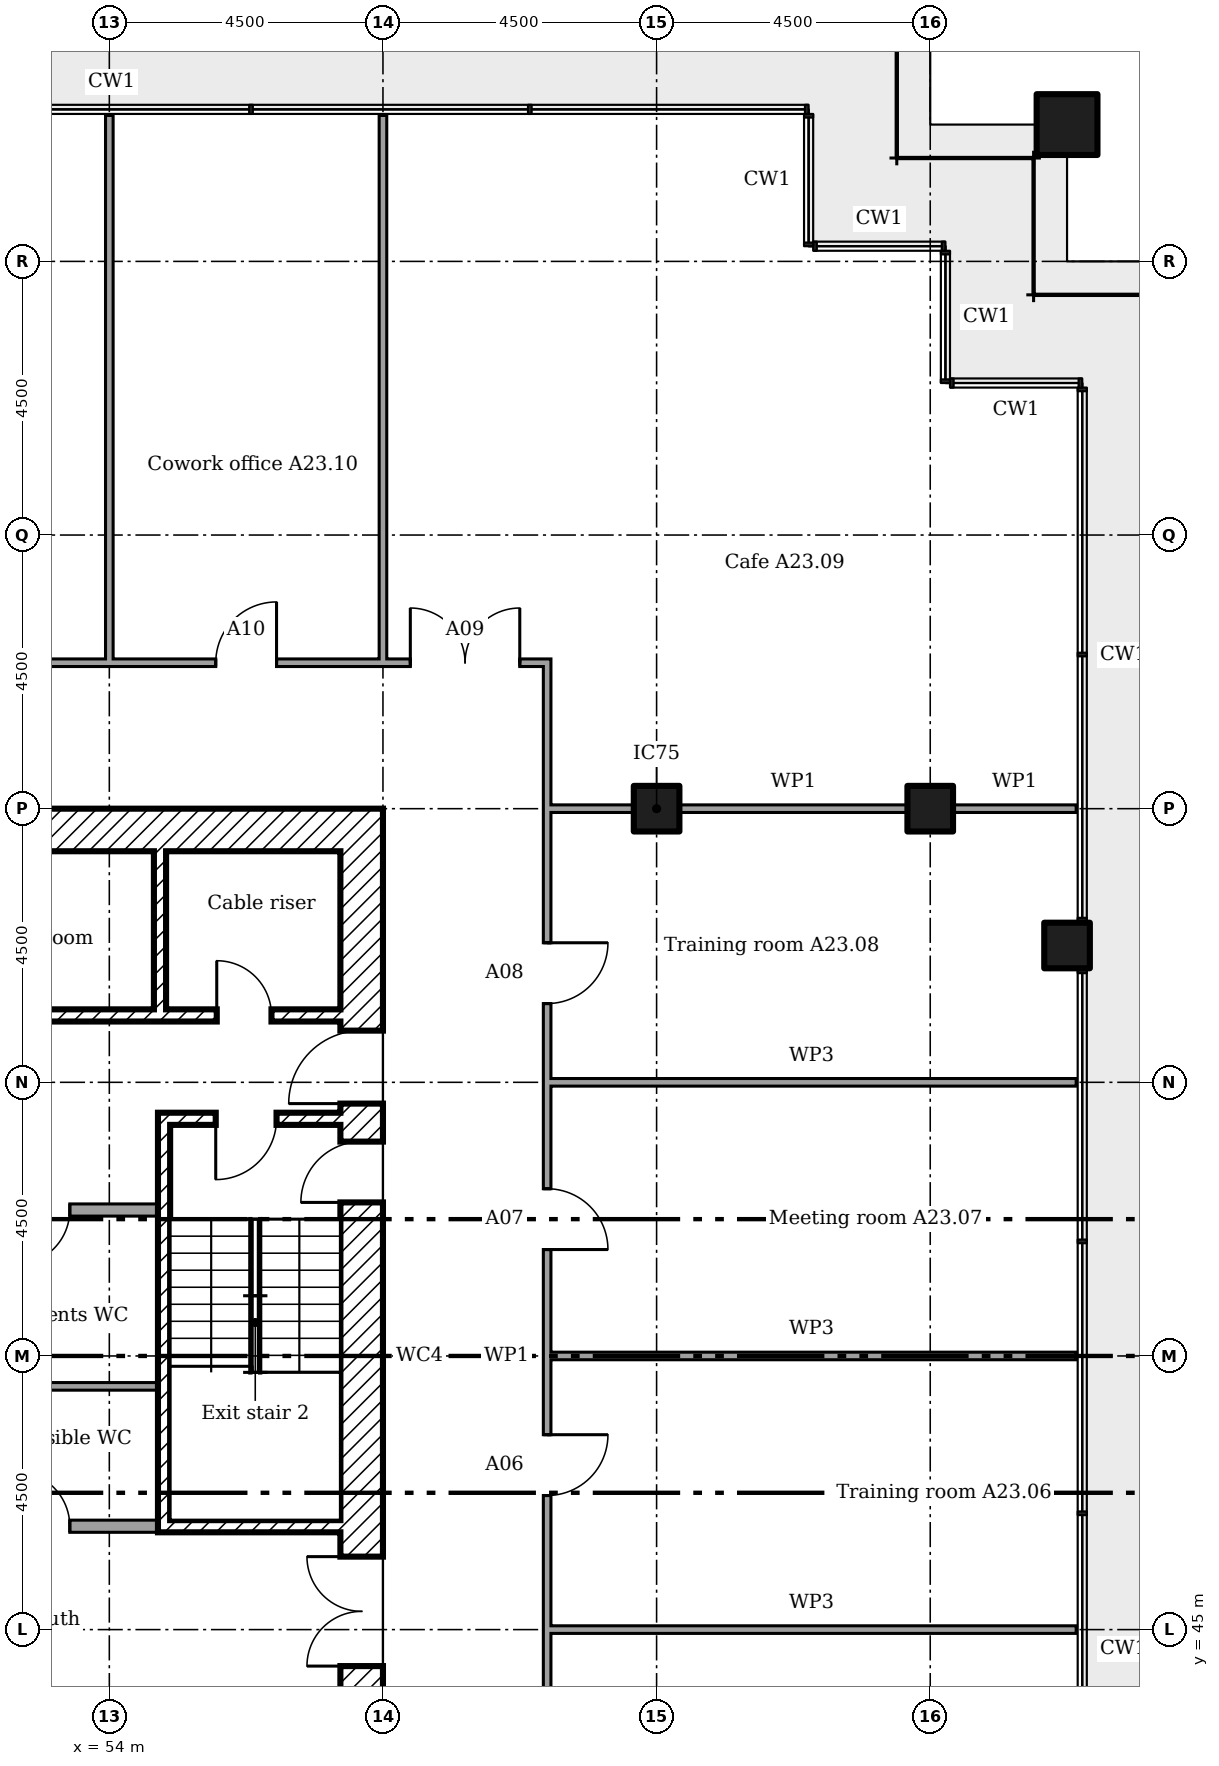
"""IFC4 building model, lengths in metres.
Left out: names, types, materials, properties, quantities, classifications, styles, units other than length and angle.
Written with IfcOpenShell. Run it as: python <this file> out.ifc"""

import sys

from ifc_helpers import new_model, si_unit, direction, frame, frame_2d, origin, origin_2d, place, context, subcontext, project, spatial, rectangle, extrude, element, fill, save


model = new_model("IFC4")
c1 = context("Model", 3, precision=1e-05, world=origin(), true_north=direction((0.0, 1.0)))
c2 = subcontext(c1, "Body", "Model", "MODEL_VIEW")
j1 = project(units=[si_unit("LENGTHUNIT", "METRE"), si_unit("PLANEANGLEUNIT", "RADIAN")], contexts=[c1])
p1 = place(None, origin())
s1 = spatial("IfcSite", under=j1, at=p1, CompositionType="ELEMENT")
p2 = place(p1, origin())
s2 = spatial("IfcBuilding", under=s1, at=p2, CompositionType="ELEMENT")
p3 = place(p2, frame((0.0, 0.0, 95.6)))
s3 = spatial("IfcBuildingStorey", under=s2, at=p3, CompositionType="ELEMENT", Elevation=95.6)
p4 = place(p3, frame((69.75, 69.75, 0.0)))
e1 = element("IfcColumn", 1, at=p4, inside=s3, PredefinedType="COLUMN", context=c2, shape_type="SweptSolid", body=[
    extrude(rectangle(XDim=1.0, YDim=1.0, at=origin_2d()), origin(), (0.0, 0.0, 1.0), 3.6),
])
for number, where in (
    (2, (63.0, 58.5, 0.0)),
    (3, (67.5, 58.5, 0.0)),
    (4, (69.75, 56.25, 0.0)),
):
    element("IfcColumn", number, at=place(p3, frame(where)), inside=s3, PredefinedType="COLUMN", context=c2, shape_type="SweptSolid", body=[
        extrude(rectangle(XDim=0.75, YDim=0.75, at=origin_2d()), origin(), (0.0, 0.0, 1.0), 3.6),
    ])
p5 = place(p3, frame((58.15, 40.5, 0.0), z_axis=(0.0, 0.0, 1.0), x_axis=(0.0, 1.0, 0.0)))
e5 = element("IfcWall", 5, at=p5, inside=s3, PredefinedType="SHEAR", context=c2, shape_type="SweptSolid", body=[
    extrude(rectangle(XDim=18.0, YDim=0.7, at=frame_2d((9.0, 0.0))), origin(), (0.0, 0.0, 1.0), 3.35),
])
p6 = place(p5, frame((13.15, 0.0, 0.0)))
e6 = element("IfcOpeningElement", 6, at=p6, cuts=e5, PredefinedType="OPENING", context=c2, shape_type="SweptSolid", body=[
    extrude(rectangle(XDim=1.2, YDim=2.1, at=frame_2d((0.6, 1.05))), frame((0.0, 0.36, 0.0), z_axis=(0.0, -1.0, 0.0), x_axis=(1.0, 0.0, 0.0)), (0.0, 0.0, 1.0), 0.72),
])
p7 = place(p5, frame((3.9, 0.0, 0.0)))
e7 = element("IfcOpeningElement", 7, at=p7, cuts=e5, PredefinedType="OPENING", context=c2, shape_type="SweptSolid", body=[
    extrude(rectangle(XDim=1.8, YDim=2.1, at=frame_2d((0.9, 1.05))), frame((0.0, 0.36, 0.0), z_axis=(0.0, -1.0, 0.0), x_axis=(1.0, 0.0, 0.0)), (0.0, 0.0, 1.0), 0.72),
])
p8 = place(p5, frame((11.525, 0.0, 0.0)))
e8 = element("IfcOpeningElement", 8, at=p8, cuts=e5, PredefinedType="OPENING", context=c2, shape_type="SweptSolid", body=[
    extrude(rectangle(XDim=1.0, YDim=2.1, at=frame_2d((0.5, 1.05))), frame((0.0, 0.36, 0.0), z_axis=(0.0, -1.0, 0.0), x_axis=(1.0, 0.0, 0.0)), (0.0, 0.0, 1.0), 0.72),
])
p9 = place(p3, frame((41.2, 58.15, 0.0)))
e9 = element("IfcWall", 9, at=p9, inside=s3, PredefinedType="SHEAR", context=c2, shape_type="SweptSolid", body=[
    extrude(rectangle(XDim=16.6, YDim=0.7, at=frame_2d((8.3, 0.0))), origin(), (0.0, 0.0, 1.0), 3.35),
])
p10 = place(p3, frame((54.833, 57.8, 0.0), z_axis=(0.0, 0.0, 1.0), x_axis=(0.0, -1.0, 0.0)))
e10 = element("IfcWall", 10, at=p10, inside=s3, PredefinedType="SHEAR", context=c2, shape_type="SweptSolid", body=[
    extrude(rectangle(XDim=2.6, YDim=0.2, at=frame_2d((1.3, 0.0))), origin(), (0.0, 0.0, 1.0), 3.35),
])
p11 = place(p3, frame((46.933, 55.1, 0.0)))
e11 = element("IfcWall", 11, at=p11, inside=s3, PredefinedType="SHEAR", context=c2, shape_type="SweptSolid", body=[
    extrude(rectangle(XDim=10.867, YDim=0.2, at=frame_2d((5.433, 0.0))), origin(), (0.0, 0.0, 1.0), 3.35),
])
p12 = place(p11, frame((8.833, 0.0, 0.0)))
e12 = element("IfcOpeningElement", 12, at=p12, cuts=e11, PredefinedType="OPENING", context=c2, shape_type="SweptSolid", body=[
    extrude(rectangle(XDim=0.9, YDim=2.1, at=frame_2d((0.45, 1.05))), frame((0.0, 0.11, 0.0), z_axis=(0.0, -1.0, 0.0), x_axis=(1.0, 0.0, 0.0)), (0.0, 0.0, 1.0), 0.22),
])
p13 = place(p11, frame((3.45, 0.0, 0.0)))
e13 = element("IfcOpeningElement", 13, at=p13, cuts=e11, PredefinedType="OPENING", context=c2, shape_type="SweptSolid", body=[
    extrude(rectangle(XDim=0.9, YDim=2.1, at=frame_2d((0.45, 1.05))), frame((0.0, 0.11, 0.0), z_axis=(0.0, -1.0, 0.0), x_axis=(1.0, 0.0, 0.0)), (0.0, 0.0, 1.0), 0.22),
])
p14 = place(p3, frame((54.8, 53.4, 0.0)))
e14 = element("IfcWall", 14, at=p14, inside=s3, PredefinedType="SHEAR", context=c2, shape_type="SweptSolid", body=[
    extrude(rectangle(XDim=3.0, YDim=0.2, at=frame_2d((1.5, 0.0))), origin(), (0.0, 0.0, 1.0), 3.35),
])
p15 = place(p14, frame((0.95, 0.0, 0.0)))
e15 = element("IfcOpeningElement", 15, at=p15, cuts=e14, PredefinedType="OPENING", context=c2, shape_type="SweptSolid", body=[
    extrude(rectangle(XDim=1.0, YDim=2.1, at=frame_2d((0.5, 1.05))), frame((0.0, 0.11, 0.0), z_axis=(0.0, -1.0, 0.0), x_axis=(1.0, 0.0, 0.0)), (0.0, 0.0, 1.0), 0.22),
])
p16 = place(p3, frame((54.8, 46.7, 0.0)))
e16 = element("IfcWall", 16, at=p16, inside=s3, PredefinedType="SHEAR", context=c2, shape_type="SweptSolid", body=[
    extrude(rectangle(XDim=3.0, YDim=0.2, at=frame_2d((1.5, 0.0))), origin(), (0.0, 0.0, 1.0), 3.35),
])
p17 = place(p3, frame((54.9, 46.8, 0.0), z_axis=(0.0, 0.0, 1.0), x_axis=(0.0, 1.0, 0.0)))
e17 = element("IfcWall", 17, at=p17, inside=s3, PredefinedType="SHEAR", context=c2, shape_type="SweptSolid", body=[
    extrude(rectangle(XDim=6.5, YDim=0.2, at=frame_2d((3.25, 0.0))), origin(), (0.0, 0.0, 1.0), 3.35),
])
p18 = place(p3, frame((44.2, 51.9, 0.0)))
e18 = element("IfcWall", 18, at=p18, inside=s3, PredefinedType="PARTITIONING", context=c2, shape_type="SweptSolid", body=[
    extrude(rectangle(XDim=10.6, YDim=0.2, at=frame_2d((5.3, 0.0))), origin(), (0.0, 0.0, 1.0), 3.35),
])
p19 = place(p18, frame((5.175, 0.0, 0.0)))
e19 = element("IfcOpeningElement", 19, at=p19, cuts=e18, PredefinedType="OPENING", context=c2, shape_type="SweptSolid", body=[
    extrude(rectangle(XDim=0.9, YDim=2.1, at=frame_2d((0.45, 1.05))), frame((0.0, 0.11, 0.0), z_axis=(0.0, -1.0, 0.0), x_axis=(1.0, 0.0, 0.0)), (0.0, 0.0, 1.0), 0.22),
])
p20 = place(p18, frame((8.25, 0.0, 0.0)))
e20 = element("IfcOpeningElement", 20, at=p20, cuts=e18, PredefinedType="OPENING", context=c2, shape_type="SweptSolid", body=[
    extrude(rectangle(XDim=0.9, YDim=2.1, at=frame_2d((0.45, 1.05))), frame((0.0, 0.11, 0.0), z_axis=(0.0, -1.0, 0.0), x_axis=(1.0, 0.0, 0.0)), (0.0, 0.0, 1.0), 0.22),
])
p21 = place(p3, frame((44.2, 46.7, 0.0)))
e21 = element("IfcWall", 21, at=p21, inside=s3, PredefinedType="PARTITIONING", context=c2, shape_type="SweptSolid", body=[
    extrude(rectangle(XDim=10.6, YDim=0.2, at=frame_2d((5.3, 0.0))), origin(), (0.0, 0.0, 1.0), 3.35),
])
p22 = place(p21, frame((1.15, 0.0, 0.0)))
e22 = element("IfcOpeningElement", 22, at=p22, cuts=e21, PredefinedType="OPENING", context=c2, shape_type="SweptSolid", body=[
    extrude(rectangle(XDim=0.9, YDim=2.1, at=frame_2d((0.45, 1.05))), frame((0.0, 0.11, 0.0), z_axis=(0.0, -1.0, 0.0), x_axis=(1.0, 0.0, 0.0)), (0.0, 0.0, 1.0), 0.22),
])
p23 = place(p21, frame((8.25, 0.0, 0.0)))
e23 = element("IfcOpeningElement", 23, at=p23, cuts=e21, PredefinedType="OPENING", context=c2, shape_type="SweptSolid", body=[
    extrude(rectangle(XDim=0.9, YDim=2.1, at=frame_2d((0.45, 1.05))), frame((0.0, 0.11, 0.0), z_axis=(0.0, -1.0, 0.0), x_axis=(1.0, 0.0, 0.0)), (0.0, 0.0, 1.0), 0.22),
])
p24 = place(p3, frame((54.8, 49.0, 0.0), z_axis=(0.0, 0.0, 1.0), x_axis=(-1.0, 0.0, 0.0)))
e24 = element("IfcWall", 24, at=p24, inside=s3, PredefinedType="PARTITIONING", context=c2, shape_type="SweptSolid", body=[
    extrude(rectangle(XDim=3.738, YDim=0.125, at=frame_2d((1.869, 0.0))), origin(), (0.0, 0.0, 1.0), 3.35),
])
for number, where in (
    (25, (61.2, 45.0, 0.0)),
    (26, (61.2, 49.5, 0.0)),
    (27, (61.2, 54.0, 0.0)),
):
    element("IfcWall", number, at=place(p3, frame(where)), inside=s3, PredefinedType="MOVABLE", context=c2, shape_type="SweptSolid", body=[
        extrude(rectangle(XDim=8.7, YDim=0.125, at=frame_2d((4.35, 0.0))), origin(), (0.0, 0.0, 1.0), 2.766),
    ])
p25 = place(p3, frame((61.2, 58.5, 0.0)))
e28 = element("IfcWall", 28, at=p25, inside=s3, PredefinedType="PARTITIONING", context=c2, shape_type="SweptSolid", body=[
    extrude(rectangle(XDim=1.425, YDim=0.125, at=frame_2d((0.712, 0.0))), origin(), (0.0, 0.0, 1.0), 2.676),
])
p26 = place(p3, frame((63.375, 58.5, 0.0)))
e29 = element("IfcWall", 29, at=p26, inside=s3, PredefinedType="PARTITIONING", context=c2, shape_type="SweptSolid", body=[
    extrude(rectangle(XDim=3.75, YDim=0.125, at=frame_2d((1.875, 0.0))), origin(), (0.0, 0.0, 1.0), 2.676),
])
p27 = place(p3, frame((67.875, 58.5, 0.0)))
e30 = element("IfcWall", 30, at=p27, inside=s3, PredefinedType="PARTITIONING", context=c2, shape_type="SweptSolid", body=[
    extrude(rectangle(XDim=2.025, YDim=0.125, at=frame_2d((1.012, 0.0))), origin(), (0.0, 0.0, 1.0), 2.676),
])
p28 = place(p3, frame((42.6, 60.9, 0.0)))
e31 = element("IfcWall", 31, at=p28, inside=s3, PredefinedType="PARTITIONING", context=c2, shape_type="SweptSolid", body=[
    extrude(rectangle(XDim=18.662, YDim=0.125, at=frame_2d((9.331, 0.0))), origin(), (0.0, 0.0, 1.0), 3.45),
])
p29 = place(p28, frame((16.35, 0.0, 0.0)))
e32 = element("IfcOpeningElement", 32, at=p29, cuts=e31, PredefinedType="OPENING", context=c2, shape_type="SweptSolid", body=[
    extrude(rectangle(XDim=1.8, YDim=2.1, at=frame_2d((0.9, 1.05))), frame((0.0, 0.073, 0.0), z_axis=(0.0, -1.0, 0.0), x_axis=(1.0, 0.0, 0.0)), (0.0, 0.0, 1.0), 0.145),
])
p30 = place(p28, frame((13.15, 0.0, 0.0)))
e33 = element("IfcOpeningElement", 33, at=p30, cuts=e31, PredefinedType="OPENING", context=c2, shape_type="SweptSolid", body=[
    extrude(rectangle(XDim=1.0, YDim=2.1, at=frame_2d((0.5, 1.05))), frame((0.0, 0.073, 0.0), z_axis=(0.0, -1.0, 0.0), x_axis=(1.0, 0.0, 0.0)), (0.0, 0.0, 1.0), 0.145),
])
p31 = place(p28, frame((8.195, 0.0, 0.0)))
e34 = element("IfcOpeningElement", 34, at=p31, cuts=e31, PredefinedType="OPENING", context=c2, shape_type="SweptSolid", body=[
    extrude(rectangle(XDim=1.0, YDim=2.1, at=frame_2d((0.5, 1.05))), frame((0.0, 0.073, 0.0), z_axis=(0.0, -1.0, 0.0), x_axis=(1.0, 0.0, 0.0)), (0.0, 0.0, 1.0), 0.145),
])
p32 = place(p28, frame((3.825, 0.0, 0.0)))
e35 = element("IfcOpeningElement", 35, at=p32, cuts=e31, PredefinedType="OPENING", context=c2, shape_type="SweptSolid", body=[
    extrude(rectangle(XDim=1.0, YDim=2.1, at=frame_2d((0.5, 1.05))), frame((0.0, 0.073, 0.0), z_axis=(0.0, -1.0, 0.0), x_axis=(1.0, 0.0, 0.0)), (0.0, 0.0, 1.0), 0.145),
])
for number, where, z_axis, x_axis in (
    (36, (54.0, 60.9, 0.0), (0.0, 0.0, 1.0), (0.0, 1.0, 0.0)),
    (37, (58.5, 60.9, 0.0), (0.0, 0.0, 1.0), (0.0, 1.0, 0.0)),
):
    element("IfcWall", number, at=place(p3, frame(where, z_axis=z_axis, x_axis=x_axis)), inside=s3, PredefinedType="PARTITIONING", context=c2, shape_type="SweptSolid", body=[
        extrude(rectangle(XDim=9.0, YDim=0.125, at=frame_2d((4.5, 0.0))), origin(), (0.0, 0.0, 1.0), 2.766),
    ])
p33 = place(p3, frame((61.2, 38.163, 0.0), z_axis=(0.0, 0.0, 1.0), x_axis=(0.0, 1.0, 0.0)))
e38 = element("IfcWall", 38, at=p33, inside=s3, PredefinedType="PARTITIONING", context=c2, shape_type="SweptSolid", body=[
    extrude(rectangle(XDim=22.675, YDim=0.125, at=frame_2d((11.337, 0.0))), origin(), (0.0, 0.0, 1.0), 3.45),
])
p34 = place(p33, frame((3.633, 0.0, 0.0)))
e39 = element("IfcOpeningElement", 39, at=p34, cuts=e38, PredefinedType="OPENING", context=c2, shape_type="SweptSolid", body=[
    extrude(rectangle(XDim=1.0, YDim=2.1, at=frame_2d((0.5, 1.05))), frame((0.0, 0.073, 0.0), z_axis=(0.0, -1.0, 0.0), x_axis=(1.0, 0.0, 0.0)), (0.0, 0.0, 1.0), 0.145),
])
p35 = place(p33, frame((9.042, 0.0, 0.0)))
e40 = element("IfcOpeningElement", 40, at=p35, cuts=e38, PredefinedType="OPENING", context=c2, shape_type="SweptSolid", body=[
    extrude(rectangle(XDim=1.0, YDim=2.1, at=frame_2d((0.5, 1.05))), frame((0.0, 0.073, 0.0), z_axis=(0.0, -1.0, 0.0), x_axis=(1.0, 0.0, 0.0)), (0.0, 0.0, 1.0), 0.145),
])
p36 = place(p33, frame((13.087, 0.0, 0.0)))
e41 = element("IfcOpeningElement", 41, at=p36, cuts=e38, PredefinedType="OPENING", context=c2, shape_type="SweptSolid", body=[
    extrude(rectangle(XDim=1.0, YDim=2.1, at=frame_2d((0.5, 1.05))), frame((0.0, 0.073, 0.0), z_axis=(0.0, -1.0, 0.0), x_axis=(1.0, 0.0, 0.0)), (0.0, 0.0, 1.0), 0.145),
])
p37 = place(p33, frame((17.133, 0.0, 0.0)))
e42 = element("IfcOpeningElement", 42, at=p37, cuts=e38, PredefinedType="OPENING", context=c2, shape_type="SweptSolid", body=[
    extrude(rectangle(XDim=1.0, YDim=2.1, at=frame_2d((0.5, 1.05))), frame((0.0, 0.073, 0.0), z_axis=(0.0, -1.0, 0.0), x_axis=(1.0, 0.0, 0.0)), (0.0, 0.0, 1.0), 0.145),
])
p38 = place(p6, origin())
e43 = element("IfcDoor", 43, at=p38, inside=s3, OperationType="SINGLE_SWING_RIGHT", PredefinedType="DOOR", context=c2, shape_type="SweptSolid", body=[
    extrude(rectangle(XDim=1.2, YDim=2.1, at=frame_2d((0.6, 1.05))), frame((0.0, 0.025, 0.0), z_axis=(0.0, -1.0, 0.0), x_axis=(1.0, 0.0, 0.0)), (0.0, 0.0, 1.0), 0.05),
])
fill(e6, e43)
p39 = place(p7, origin())
e44 = element("IfcDoor", 44, at=p39, inside=s3, OperationType="DOUBLE_DOOR_SINGLE_SWING", PredefinedType="DOOR", context=c2, shape_type="SweptSolid", body=[
    extrude(rectangle(XDim=1.8, YDim=2.1, at=frame_2d((0.9, 1.05))), frame((0.0, 0.025, 0.0), z_axis=(0.0, -1.0, 0.0), x_axis=(1.0, 0.0, 0.0)), (0.0, 0.0, 1.0), 0.05),
])
fill(e7, e44)
p40 = place(p15, frame((1.0, 0.0, 0.0), x_axis=(-1.0, 0.0, 0.0)))
e45 = element("IfcDoor", 45, at=p40, inside=s3, OperationType="SINGLE_SWING_LEFT", PredefinedType="DOOR", context=c2, shape_type="SweptSolid", body=[
    extrude(rectangle(XDim=1.0, YDim=2.1, at=frame_2d((0.5, 1.05))), frame((0.0, 0.025, 0.0), z_axis=(0.0, -1.0, 0.0), x_axis=(1.0, 0.0, 0.0)), (0.0, 0.0, 1.0), 0.05),
])
fill(e15, e45)
p41 = place(p8, origin())
e46 = element("IfcDoor", 46, at=p41, inside=s3, OperationType="SINGLE_SWING_RIGHT", PredefinedType="DOOR", context=c2, shape_type="SweptSolid", body=[
    extrude(rectangle(XDim=1.0, YDim=2.1, at=frame_2d((0.5, 1.05))), frame((0.0, 0.025, 0.0), z_axis=(0.0, -1.0, 0.0), x_axis=(1.0, 0.0, 0.0)), (0.0, 0.0, 1.0), 0.05),
])
fill(e8, e46)
p42 = place(p12, origin())
e47 = element("IfcDoor", 47, at=p42, inside=s3, OperationType="SINGLE_SWING_RIGHT", PredefinedType="DOOR", context=c2, shape_type="SweptSolid", body=[
    extrude(rectangle(XDim=0.9, YDim=2.1, at=frame_2d((0.45, 1.05))), frame((0.0, 0.025, 0.0), z_axis=(0.0, -1.0, 0.0), x_axis=(1.0, 0.0, 0.0)), (0.0, 0.0, 1.0), 0.05),
])
fill(e12, e47)
p43 = place(p23, origin())
e48 = element("IfcDoor", 48, at=p43, inside=s3, OperationType="SINGLE_SWING_RIGHT", PredefinedType="DOOR", context=c2, shape_type="SweptSolid", body=[
    extrude(rectangle(XDim=0.9, YDim=2.1, at=frame_2d((0.45, 1.05))), frame((0.0, 0.025, 0.0), z_axis=(0.0, -1.0, 0.0), x_axis=(1.0, 0.0, 0.0)), (0.0, 0.0, 1.0), 0.05),
])
fill(e23, e48)
p44 = place(p20, frame((0.9, 0.0, 0.0), x_axis=(-1.0, 0.0, 0.0)))
e49 = element("IfcDoor", 49, at=p44, inside=s3, OperationType="SINGLE_SWING_LEFT", PredefinedType="DOOR", context=c2, shape_type="SweptSolid", body=[
    extrude(rectangle(XDim=0.9, YDim=2.1, at=frame_2d((0.45, 1.05))), frame((0.0, 0.025, 0.0), z_axis=(0.0, -1.0, 0.0), x_axis=(1.0, 0.0, 0.0)), (0.0, 0.0, 1.0), 0.05),
])
fill(e20, e49)
p45 = place(p35, frame((1.0, 0.0, 0.0), x_axis=(-1.0, 0.0, 0.0)))
e50 = element("IfcDoor", 50, at=p45, inside=s3, OperationType="SINGLE_SWING_RIGHT", PredefinedType="DOOR", context=c2, shape_type="SweptSolid", body=[
    extrude(rectangle(XDim=1.0, YDim=2.1, at=frame_2d((0.5, 1.05))), frame((0.0, 0.025, 0.0), z_axis=(0.0, -1.0, 0.0), x_axis=(1.0, 0.0, 0.0)), (0.0, 0.0, 1.0), 0.05),
])
fill(e40, e50)
p46 = place(p36, frame((1.0, 0.0, 0.0), x_axis=(-1.0, 0.0, 0.0)))
e51 = element("IfcDoor", 51, at=p46, inside=s3, OperationType="SINGLE_SWING_LEFT", PredefinedType="DOOR", context=c2, shape_type="SweptSolid", body=[
    extrude(rectangle(XDim=1.0, YDim=2.1, at=frame_2d((0.5, 1.05))), frame((0.0, 0.025, 0.0), z_axis=(0.0, -1.0, 0.0), x_axis=(1.0, 0.0, 0.0)), (0.0, 0.0, 1.0), 0.05),
])
fill(e41, e51)
p47 = place(p37, frame((1.0, 0.0, 0.0), x_axis=(-1.0, 0.0, 0.0)))
e52 = element("IfcDoor", 52, at=p47, inside=s3, OperationType="SINGLE_SWING_RIGHT", PredefinedType="DOOR", context=c2, shape_type="SweptSolid", body=[
    extrude(rectangle(XDim=1.0, YDim=2.1, at=frame_2d((0.5, 1.05))), frame((0.0, 0.025, 0.0), z_axis=(0.0, -1.0, 0.0), x_axis=(1.0, 0.0, 0.0)), (0.0, 0.0, 1.0), 0.05),
])
fill(e42, e52)
p48 = place(p29, origin())
e53 = element("IfcDoor", 53, at=p48, inside=s3, OperationType="DOUBLE_DOOR_SINGLE_SWING", PredefinedType="DOOR", context=c2, shape_type="SweptSolid", body=[
    extrude(rectangle(XDim=1.8, YDim=2.1, at=frame_2d((0.9, 1.05))), frame((0.0, 0.025, 0.0), z_axis=(0.0, -1.0, 0.0), x_axis=(1.0, 0.0, 0.0)), (0.0, 0.0, 1.0), 0.05),
])
fill(e32, e53)
p49 = place(p30, origin())
e54 = element("IfcDoor", 54, at=p49, inside=s3, OperationType="SINGLE_SWING_LEFT", PredefinedType="DOOR", context=c2, shape_type="SweptSolid", body=[
    extrude(rectangle(XDim=1.0, YDim=2.1, at=frame_2d((0.5, 1.05))), frame((0.0, 0.025, 0.0), z_axis=(0.0, -1.0, 0.0), x_axis=(1.0, 0.0, 0.0)), (0.0, 0.0, 1.0), 0.05),
])
fill(e33, e54)
save(model, sys.argv[1])
